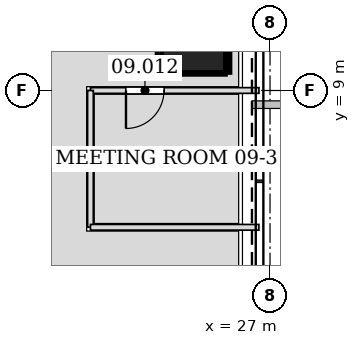
"""IFC4 building model, lengths in metres.
Left out: names, types, materials, properties, quantities, classifications, styles, units other than length and angle.
Written with IfcOpenShell. Run it as: python <this file> out.ifc"""

import sys

from ifc_helpers import new_model, si_unit, direction, frame, frame_2d, origin, origin_2d, place, context, subcontext, project, spatial, rectangle, hollow_rectangle, extrude, element, fill, save


model = new_model("IFC4")
c1 = context("Model", 3, precision=1e-05, world=origin(), true_north=direction((0.0, 1.0)))
c2 = subcontext(c1, "Body", "Model", "MODEL_VIEW")
j1 = project(units=[si_unit("LENGTHUNIT", "METRE"), si_unit("PLANEANGLEUNIT", "RADIAN")], contexts=[c1])
p1 = place(None, origin())
s1 = spatial("IfcSite", under=j1, at=p1, CompositionType="ELEMENT")
p2 = place(p1, origin())
s2 = spatial("IfcBuilding", under=s1, at=p2, CompositionType="ELEMENT")
p3 = place(p2, frame((0.0, 0.0, 45.6)))
s3 = spatial("IfcBuildingStorey", under=s2, at=p3, CompositionType="ELEMENT", Elevation=45.6)
p4 = place(p3, frame((25.047, 10.375, 0.0), z_axis=(-0.028295749455, -0.011678533143, 0.999531371407), x_axis=(0.38151339852, -0.924363308851, 0.0)))
e1 = element("IfcColumn", 1, at=p4, inside=s3, PredefinedType="COLUMN", context=c2, shape_type="SweptSolid", body=[
    extrude(hollow_rectangle(XDim=1.8, YDim=1.8, WallThickness=0.085, at=origin_2d()), origin(), (0.0, 0.0, 1.0), 4.202),
])
p5 = place(p3, frame((26.709, 9.0, 0.0), z_axis=(0.0, 0.0, 1.0), x_axis=(-1.0, 0.0, 0.0)))
e2 = element("IfcWall", 2, at=p5, inside=s3, PredefinedType="PARTITIONING", context=c2, shape_type="SweptSolid", body=[
    extrude(rectangle(XDim=4.434, YDim=0.15, at=frame_2d((2.217, 0.0))), origin(), (0.0, 0.0, 1.0), 3.423),
])
p6 = place(p5, frame((2.499, 0.0, 0.0)))
e3 = element("IfcOpeningElement", 3, at=p6, cuts=e2, PredefinedType="OPENING", context=c2, shape_type="SweptSolid", body=[
    extrude(rectangle(XDim=1.0, YDim=2.1, at=frame_2d((0.5, 1.05))), frame((0.0, 0.085, 0.0), z_axis=(0.0, -1.0, 0.0), x_axis=(1.0, 0.0, 0.0)), (0.0, 0.0, 1.0), 0.17),
])
p7 = place(p3, frame((22.275, 9.0, 0.0), z_axis=(0.0, 0.0, 1.0), x_axis=(0.0, -1.0, 0.0)))
e4 = element("IfcWall", 4, at=p7, inside=s3, PredefinedType="PARTITIONING", context=c2, shape_type="SweptSolid", body=[
    extrude(rectangle(XDim=3.6, YDim=0.15, at=frame_2d((1.8, 0.0))), origin(), (0.0, 0.0, 1.0), 4.035),
])
p8 = place(p3, frame((22.275, 5.4, 0.0), z_axis=(0.0, 0.0, 1.0), x_axis=(1.0, 0.0, 0.0)))
e5 = element("IfcWall", 5, at=p8, inside=s3, PredefinedType="PARTITIONING", context=c2, shape_type="SweptSolid", body=[
    extrude(rectangle(XDim=4.432, YDim=0.15, at=frame_2d((2.216, 0.0))), origin(), (0.0, 0.0, 1.0), 3.423),
])
p9 = place(p6, origin())
e6 = element("IfcDoor", 6, at=p9, inside=s3, OperationType="SINGLE_SWING_RIGHT", PredefinedType="DOOR", context=c2, shape_type="SweptSolid", body=[
    extrude(rectangle(XDim=1.0, YDim=2.1, at=frame_2d((0.5, 1.05))), frame((0.0, 0.025, 0.0), z_axis=(0.0, -1.0, 0.0), x_axis=(1.0, 0.0, 0.0)), (0.0, 0.0, 1.0), 0.05),
])
fill(e3, e6)
save(model, sys.argv[1])
